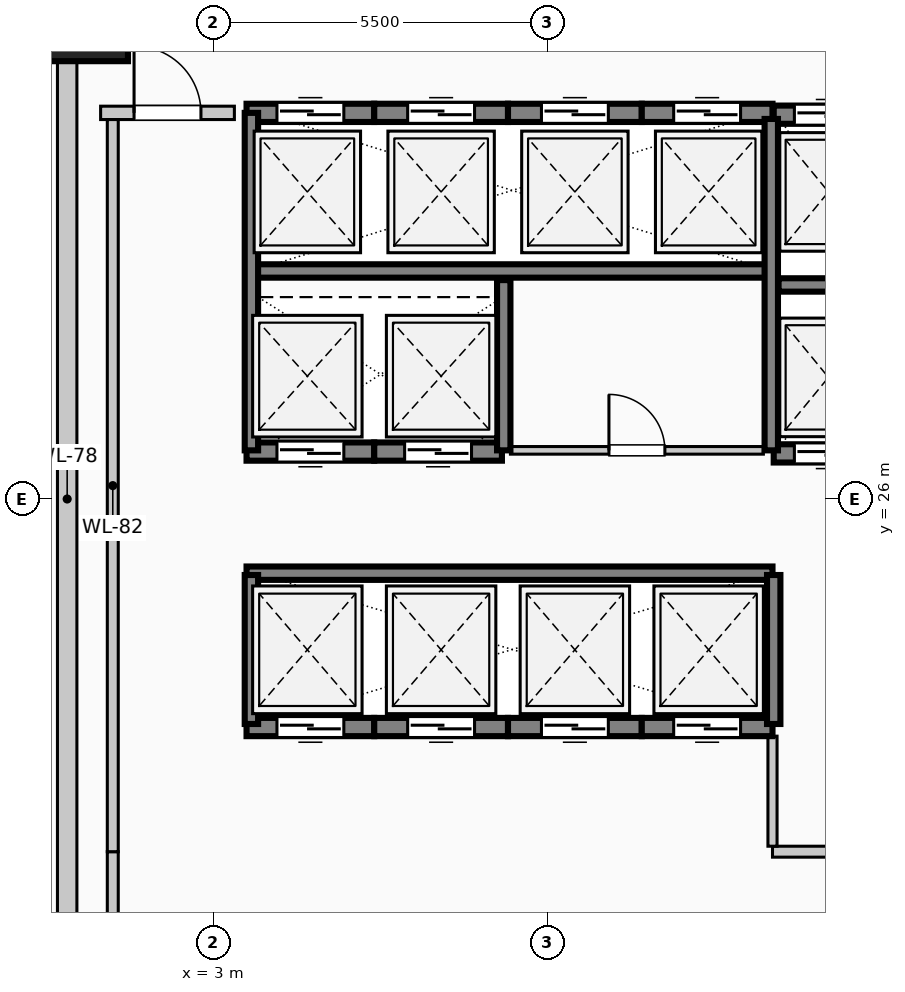
"""IFC4 building model, lengths in metres.
Left out: names, types, materials, properties, quantities, classifications, styles, units other than length and angle.
Written with IfcOpenShell. Run it as: python <this file> out.ifc"""

import sys

from ifc_helpers import new_model, si_unit, direction, frame, frame_2d, origin, origin_2d, place, context, subcontext, project, spatial, rectangle, extrude, element, fill, save


model = new_model("IFC4")
c1 = context("Model", 3, precision=1e-05, world=origin(), true_north=direction((0.0, 1.0)))
c2 = subcontext(c1, "Body", "Model", "MODEL_VIEW")
j1 = project(units=[si_unit("LENGTHUNIT", "METRE"), si_unit("PLANEANGLEUNIT", "RADIAN")], contexts=[c1])
p1 = place(None, origin())
s1 = spatial("IfcSite", under=j1, at=p1, CompositionType="ELEMENT")
p2 = place(p1, origin())
s2 = spatial("IfcBuilding", under=s1, at=p2, CompositionType="ELEMENT")
p3 = place(p2, origin())
s3 = spatial("IfcBuildingStorey", under=s2, at=p3, CompositionType="ELEMENT", Elevation=0.0)
p4 = place(p3, frame((0.6, 34.0, 0.0), z_axis=(0.0, 0.0, 1.0), x_axis=(0.0, 1.0, 0.0)))
e1 = element("IfcColumn", 1, at=p4, inside=s3, PredefinedType="COLUMN", context=c2, shape_type="SweptSolid", body=[
    extrude(rectangle(XDim=1.6, YDim=2.0, at=origin_2d()), origin(), (0.0, 0.0, 1.0), 5.4),
])
p5 = place(p3, frame((0.6, 18.82, 0.0), z_axis=(0.0, 0.0, 1.0), x_axis=(0.0, 1.0, 0.0)))
e2 = element("IfcWall", 2, at=p5, inside=s3, PredefinedType="SOLIDWALL", context=c2, shape_type="SweptSolid", body=[
    extrude(rectangle(XDim=14.36, YDim=0.32, at=frame_2d((7.18, 0.0))), origin(), (0.0, 0.0, 1.0), 4.05),
])
p6 = place(p3, frame((5.65, 22.25, 0.0), z_axis=(0.0, 0.0, 1.0), x_axis=(-1.0, 0.0, 0.0)))
e3 = element("IfcWall", 3, at=p6, inside=s3, PredefinedType="SOLIDWALL", context=c2, shape_type="SweptSolid", body=[
    extrude(rectangle(XDim=2.1, YDim=0.3, at=frame_2d((1.05, 0.0))), origin(), (0.0, 0.0, 1.0), 5.4),
])
p7 = place(p6, frame((0.5, 0.0, 0.0)))
e4 = element("IfcOpeningElement", 4, at=p7, cuts=e3, PredefinedType="OPENING", context=c2, shape_type="SweptSolid", body=[
    extrude(rectangle(XDim=1.1, YDim=2.2, at=frame_2d((0.55, 1.1))), frame((0.0, 0.16, 0.0), z_axis=(0.0, -1.0, 0.0), x_axis=(1.0, 0.0, 0.0)), (0.0, 0.0, 1.0), 0.32),
])
p8 = place(p3, frame((7.85, 22.25, 0.0), z_axis=(0.0, 0.0, 1.0), x_axis=(-1.0, 0.0, 0.0)))
e5 = element("IfcWall", 5, at=p8, inside=s3, PredefinedType="SOLIDWALL", context=c2, shape_type="SweptSolid", body=[
    extrude(rectangle(XDim=2.2, YDim=0.3, at=frame_2d((1.1, 0.0))), origin(), (0.0, 0.0, 1.0), 5.4),
])
p9 = place(p8, frame((0.55, 0.0, 0.0)))
e6 = element("IfcOpeningElement", 6, at=p9, cuts=e5, PredefinedType="OPENING", context=c2, shape_type="SweptSolid", body=[
    extrude(rectangle(XDim=1.1, YDim=2.2, at=frame_2d((0.55, 1.1))), frame((0.0, 0.16, 0.0), z_axis=(0.0, -1.0, 0.0), x_axis=(1.0, 0.0, 0.0)), (0.0, 0.0, 1.0), 0.32),
])
p10 = place(p3, frame((10.05, 22.25, 0.0), z_axis=(0.0, 0.0, 1.0), x_axis=(-1.0, 0.0, 0.0)))
e7 = element("IfcWall", 7, at=p10, inside=s3, PredefinedType="SOLIDWALL", context=c2, shape_type="SweptSolid", body=[
    extrude(rectangle(XDim=2.2, YDim=0.3, at=frame_2d((1.1, 0.0))), origin(), (0.0, 0.0, 1.0), 5.4),
])
p11 = place(p10, frame((0.55, 0.0, 0.0)))
e8 = element("IfcOpeningElement", 8, at=p11, cuts=e7, PredefinedType="OPENING", context=c2, shape_type="SweptSolid", body=[
    extrude(rectangle(XDim=1.1, YDim=2.2, at=frame_2d((0.55, 1.1))), frame((0.0, 0.16, 0.0), z_axis=(0.0, -1.0, 0.0), x_axis=(1.0, 0.0, 0.0)), (0.0, 0.0, 1.0), 0.32),
])
p12 = place(p3, frame((12.2, 22.25, 0.0), z_axis=(0.0, 0.0, 1.0), x_axis=(-1.0, 0.0, 0.0)))
e9 = element("IfcWall", 9, at=p12, inside=s3, PredefinedType="SOLIDWALL", context=c2, shape_type="SweptSolid", body=[
    extrude(rectangle(XDim=2.15, YDim=0.3, at=frame_2d((1.075, 0.0))), origin(), (0.0, 0.0, 1.0), 5.4),
])
p13 = place(p12, frame((0.525, 0.0, 0.0)))
e10 = element("IfcOpeningElement", 10, at=p13, cuts=e9, PredefinedType="OPENING", context=c2, shape_type="SweptSolid", body=[
    extrude(rectangle(XDim=1.1, YDim=2.2, at=frame_2d((0.55, 1.1))), frame((0.0, 0.16, 0.0), z_axis=(0.0, -1.0, 0.0), x_axis=(1.0, 0.0, 0.0)), (0.0, 0.0, 1.0), 0.32),
])
p14 = place(p3, frame((14.0, 26.75, 0.0), z_axis=(0.0, 0.0, 1.0), x_axis=(-1.0, 0.0, 0.0)))
e11 = element("IfcWall", 11, at=p14, inside=s3, PredefinedType="SOLIDWALL", context=c2, shape_type="SweptSolid", body=[
    extrude(rectangle(XDim=1.78, YDim=0.3, at=frame_2d((0.89, 0.0))), origin(), (0.0, 0.0, 1.0), 5.4),
])
p15 = place(p14, frame((0.34, 0.0, 0.0)))
e12 = element("IfcOpeningElement", 12, at=p15, cuts=e11, PredefinedType="OPENING", context=c2, shape_type="SweptSolid", body=[
    extrude(rectangle(XDim=1.1, YDim=2.2, at=frame_2d((0.55, 1.1))), frame((0.0, 0.16, 0.0), z_axis=(0.0, -1.0, 0.0), x_axis=(1.0, 0.0, 0.0)), (0.0, 0.0, 1.0), 0.32),
])
p16 = place(p3, frame((12.22, 32.32, 0.0), z_axis=(0.0, 0.0, 1.0), x_axis=(1.0, 0.0, 0.0)))
e13 = element("IfcWall", 13, at=p16, inside=s3, PredefinedType="SOLIDWALL", context=c2, shape_type="SweptSolid", body=[
    extrude(rectangle(XDim=1.78, YDim=0.3, at=frame_2d((0.89, 0.0))), origin(), (0.0, 0.0, 1.0), 5.4),
])
p17 = place(p16, frame((0.34, 0.0, 0.0)))
e14 = element("IfcOpeningElement", 14, at=p17, cuts=e13, PredefinedType="OPENING", context=c2, shape_type="SweptSolid", body=[
    extrude(rectangle(XDim=1.1, YDim=2.2, at=frame_2d((0.55, 1.1))), frame((0.0, 0.16, 0.0), z_axis=(0.0, -1.0, 0.0), x_axis=(1.0, 0.0, 0.0)), (0.0, 0.0, 1.0), 0.32),
])
p18 = place(p3, frame((3.55, 32.35, 0.0), z_axis=(0.0, 0.0, 1.0), x_axis=(1.0, 0.0, 0.0)))
e15 = element("IfcWall", 15, at=p18, inside=s3, PredefinedType="SOLIDWALL", context=c2, shape_type="SweptSolid", body=[
    extrude(rectangle(XDim=2.1, YDim=0.3, at=frame_2d((1.05, 0.0))), origin(), (0.0, 0.0, 1.0), 5.4),
])
p19 = place(p18, frame((0.5, 0.0, 0.0)))
e16 = element("IfcOpeningElement", 16, at=p19, cuts=e15, PredefinedType="OPENING", context=c2, shape_type="SweptSolid", body=[
    extrude(rectangle(XDim=1.1, YDim=2.2, at=frame_2d((0.55, 1.1))), frame((0.0, 0.16, 0.0), z_axis=(0.0, -1.0, 0.0), x_axis=(1.0, 0.0, 0.0)), (0.0, 0.0, 1.0), 0.32),
])
p20 = place(p3, frame((5.65, 32.35, 0.0), z_axis=(0.0, 0.0, 1.0), x_axis=(1.0, 0.0, 0.0)))
e17 = element("IfcWall", 17, at=p20, inside=s3, PredefinedType="SOLIDWALL", context=c2, shape_type="SweptSolid", body=[
    extrude(rectangle(XDim=2.2, YDim=0.3, at=frame_2d((1.1, 0.0))), origin(), (0.0, 0.0, 1.0), 5.4),
])
p21 = place(p20, frame((0.55, 0.0, 0.0)))
e18 = element("IfcOpeningElement", 18, at=p21, cuts=e17, PredefinedType="OPENING", context=c2, shape_type="SweptSolid", body=[
    extrude(rectangle(XDim=1.1, YDim=2.2, at=frame_2d((0.55, 1.1))), frame((0.0, 0.16, 0.0), z_axis=(0.0, -1.0, 0.0), x_axis=(1.0, 0.0, 0.0)), (0.0, 0.0, 1.0), 0.32),
])
p22 = place(p3, frame((7.85, 32.35, 0.0), z_axis=(0.0, 0.0, 1.0), x_axis=(1.0, 0.0, 0.0)))
e19 = element("IfcWall", 19, at=p22, inside=s3, PredefinedType="SOLIDWALL", context=c2, shape_type="SweptSolid", body=[
    extrude(rectangle(XDim=2.2, YDim=0.3, at=frame_2d((1.1, 0.0))), origin(), (0.0, 0.0, 1.0), 5.4),
])
p23 = place(p22, frame((0.55, 0.0, 0.0)))
e20 = element("IfcOpeningElement", 20, at=p23, cuts=e19, PredefinedType="OPENING", context=c2, shape_type="SweptSolid", body=[
    extrude(rectangle(XDim=1.1, YDim=2.2, at=frame_2d((0.55, 1.1))), frame((0.0, 0.16, 0.0), z_axis=(0.0, -1.0, 0.0), x_axis=(1.0, 0.0, 0.0)), (0.0, 0.0, 1.0), 0.32),
])
p24 = place(p3, frame((10.05, 32.35, 0.0), z_axis=(0.0, 0.0, 1.0), x_axis=(1.0, 0.0, 0.0)))
e21 = element("IfcWall", 21, at=p24, inside=s3, PredefinedType="SOLIDWALL", context=c2, shape_type="SweptSolid", body=[
    extrude(rectangle(XDim=2.15, YDim=0.3, at=frame_2d((1.075, 0.0))), origin(), (0.0, 0.0, 1.0), 5.4),
])
p25 = place(p24, frame((0.525, 0.0, 0.0)))
e22 = element("IfcOpeningElement", 22, at=p25, cuts=e21, PredefinedType="OPENING", context=c2, shape_type="SweptSolid", body=[
    extrude(rectangle(XDim=1.1, YDim=2.2, at=frame_2d((0.55, 1.1))), frame((0.0, 0.16, 0.0), z_axis=(0.0, -1.0, 0.0), x_axis=(1.0, 0.0, 0.0)), (0.0, 0.0, 1.0), 0.32),
])
p26 = place(p3, frame((5.65, 26.78, 0.0), z_axis=(0.0, 0.0, 1.0), x_axis=(-1.0, 0.0, 0.0)))
e23 = element("IfcWall", 23, at=p26, inside=s3, PredefinedType="SOLIDWALL", context=c2, shape_type="SweptSolid", body=[
    extrude(rectangle(XDim=2.1, YDim=0.3, at=frame_2d((1.05, 0.0))), origin(), (0.0, 0.0, 1.0), 5.4),
])
p27 = place(p26, frame((0.5, 0.0, 0.0)))
e24 = element("IfcOpeningElement", 24, at=p27, cuts=e23, PredefinedType="OPENING", context=c2, shape_type="SweptSolid", body=[
    extrude(rectangle(XDim=1.1, YDim=2.2, at=frame_2d((0.55, 1.1))), frame((0.0, 0.16, 0.0), z_axis=(0.0, -1.0, 0.0), x_axis=(1.0, 0.0, 0.0)), (0.0, 0.0, 1.0), 0.32),
])
p28 = place(p3, frame((7.75, 26.78, 0.0), z_axis=(0.0, 0.0, 1.0), x_axis=(-1.0, 0.0, 0.0)))
e25 = element("IfcWall", 25, at=p28, inside=s3, PredefinedType="SOLIDWALL", context=c2, shape_type="SweptSolid", body=[
    extrude(rectangle(XDim=2.1, YDim=0.3, at=frame_2d((1.05, 0.0))), origin(), (0.0, 0.0, 1.0), 5.4),
])
p29 = place(p28, frame((0.5, 0.0, 0.0)))
e26 = element("IfcOpeningElement", 26, at=p29, cuts=e25, PredefinedType="OPENING", context=c2, shape_type="SweptSolid", body=[
    extrude(rectangle(XDim=1.1, YDim=2.2, at=frame_2d((0.55, 1.1))), frame((0.0, 0.16, 0.0), z_axis=(0.0, -1.0, 0.0), x_axis=(1.0, 0.0, 0.0)), (0.0, 0.0, 1.0), 0.32),
])
p30 = place(p3, frame((3.55, 29.75, 0.0), z_axis=(0.0, 0.0, 1.0), x_axis=(1.0, 0.0, 0.0)))
e27 = element("IfcWall", 27, at=p30, inside=s3, PredefinedType="SOLIDWALL", context=c2, shape_type="SweptSolid", body=[
    extrude(rectangle(XDim=8.65, YDim=0.22, at=frame_2d((4.325, 0.0))), origin(), (0.0, 0.0, 1.0), 5.4),
])
p31 = place(p3, frame((3.63, 26.8, 0.0), z_axis=(0.0, 0.0, 1.0), x_axis=(0.0, 1.0, 0.0)))
e28 = element("IfcWall", 28, at=p31, inside=s3, PredefinedType="SOLIDWALL", context=c2, shape_type="SweptSolid", body=[
    extrude(rectangle(XDim=5.55, YDim=0.22, at=frame_2d((2.775, 0.0))), origin(), (0.0, 0.0, 1.0), 5.4),
])
p32 = place(p3, frame((7.78, 26.8, 0.0), z_axis=(0.0, 0.0, 1.0), x_axis=(0.0, 1.0, 0.0)))
e29 = element("IfcWall", 29, at=p32, inside=s3, PredefinedType="SOLIDWALL", context=c2, shape_type="SweptSolid", body=[
    extrude(rectangle(XDim=2.8, YDim=0.22, at=frame_2d((1.4, 0.0))), origin(), (0.0, 0.0, 1.0), 5.4),
])
p33 = place(p3, frame((12.18, 26.8, 0.0), z_axis=(0.0, 0.0, 1.0), x_axis=(0.0, 1.0, 0.0)))
e30 = element("IfcWall", 30, at=p33, inside=s3, PredefinedType="SOLIDWALL", context=c2, shape_type="SweptSolid", body=[
    extrude(rectangle(XDim=5.45, YDim=0.22, at=frame_2d((2.725, 0.0))), origin(), (0.0, 0.0, 1.0), 5.4),
])
p34 = place(p3, frame((12.3, 29.52, 0.0), z_axis=(0.0, 0.0, 1.0), x_axis=(1.0, 0.0, 0.0)))
e31 = element("IfcWall", 31, at=p34, inside=s3, PredefinedType="SOLIDWALL", context=c2, shape_type="SweptSolid", body=[
    extrude(rectangle(XDim=3.4, YDim=0.22, at=frame_2d((1.7, 0.0))), origin(), (0.0, 0.0, 1.0), 5.4),
])
p35 = place(p3, frame((3.55, 24.78, 0.0), z_axis=(0.0, 0.0, 1.0), x_axis=(1.0, 0.0, 0.0)))
e32 = element("IfcWall", 32, at=p35, inside=s3, PredefinedType="SOLIDWALL", context=c2, shape_type="SweptSolid", body=[
    extrude(rectangle(XDim=8.65, YDim=0.22, at=frame_2d((4.325, 0.0))), origin(), (0.0, 0.0, 1.0), 5.4),
])
for number, where, z_axis, x_axis in (
    (33, (3.63, 22.3, 0.0), (0.0, 0.0, 1.0), (0.0, 1.0, 0.0)),
    (34, (12.22, 22.3, 0.0), (0.0, 0.0, 1.0), (0.0, 1.0, 0.0)),
):
    element("IfcWall", number, at=place(p3, frame(where, z_axis=z_axis, x_axis=x_axis)), inside=s3, PredefinedType="SOLIDWALL", context=c2, shape_type="SweptSolid", body=[
        extrude(rectangle(XDim=2.45, YDim=0.22, at=frame_2d((1.225, 0.0))), origin(), (0.0, 0.0, 1.0), 5.4),
    ])
p36 = place(p3, frame((1.15, 32.35, 0.0), z_axis=(0.0, 0.0, 1.0), x_axis=(1.0, 0.0, 0.0)))
e35 = element("IfcWall", 35, at=p36, inside=s3, PredefinedType="PARTITIONING", context=c2, shape_type="SweptSolid", body=[
    extrude(rectangle(XDim=2.2, YDim=0.22, at=frame_2d((1.1, 0.0))), origin(), (0.0, 0.0, 1.0), 5.0),
])
p37 = place(p36, frame((0.55, 0.0, 0.0)))
e36 = element("IfcOpeningElement", 36, at=p37, cuts=e35, PredefinedType="OPENING", context=c2, shape_type="SweptSolid", body=[
    extrude(rectangle(XDim=1.1, YDim=2.2, at=frame_2d((0.55, 1.1))), frame((0.0, 0.12, 0.0), z_axis=(0.0, -1.0, 0.0), x_axis=(1.0, 0.0, 0.0)), (0.0, 0.0, 1.0), 0.24),
])
p38 = place(p3, frame((12.2, 20.2, 0.0), z_axis=(0.0, 0.0, 1.0), x_axis=(1.0, 0.0, 0.0)))
e37 = element("IfcWall", 37, at=p38, inside=s3, PredefinedType="PARTITIONING", context=c2, shape_type="SweptSolid", body=[
    extrude(rectangle(XDim=3.65, YDim=0.18, at=frame_2d((1.825, 0.0))), origin(), (0.0, 0.0, 1.0), 5.0),
])
p39 = place(p3, frame((7.89, 26.8, 0.0), z_axis=(0.0, 0.0, 1.0), x_axis=(1.0, 0.0, 0.0)))
e38 = element("IfcWall", 38, at=p39, inside=s3, PredefinedType="PARTITIONING", context=c2, shape_type="SweptSolid", body=[
    extrude(rectangle(XDim=4.16, YDim=0.125, at=frame_2d((2.08, 0.0))), origin(), (0.0, 0.0, 1.0), 5.0),
])
p40 = place(p39, frame((1.62, 0.0, 0.0)))
e39 = element("IfcOpeningElement", 39, at=p40, cuts=e38, PredefinedType="OPENING", context=c2, shape_type="SweptSolid", body=[
    extrude(rectangle(XDim=0.92, YDim=2.1, at=frame_2d((0.46, 1.05))), frame((0.0, 0.073, 0.0), z_axis=(0.0, -1.0, 0.0), x_axis=(1.0, 0.0, 0.0)), (0.0, 0.0, 1.0), 0.145),
])
p41 = place(p3, frame((1.35, 19.0, 0.0), z_axis=(0.0, 0.0, 1.0), x_axis=(0.0, 1.0, 0.0)))
e40 = element("IfcWall", 40, at=p41, inside=s3, PredefinedType="PARTITIONING", context=c2, shape_type="SweptSolid", body=[
    extrude(rectangle(XDim=1.2, YDim=0.18, at=frame_2d((0.6, 0.0))), origin(), (0.0, 0.0, 1.0), 5.0),
])
p42 = place(p3, frame((1.35, 20.2, 0.0), z_axis=(0.0, 0.0, 1.0), x_axis=(0.0, 1.0, 0.0)))
e41 = element("IfcWall", 41, at=p42, inside=s3, PredefinedType="PARTITIONING", context=c2, shape_type="SweptSolid", body=[
    extrude(rectangle(XDim=12.04, YDim=0.18, at=frame_2d((6.02, 0.0))), origin(), (0.0, 0.0, 1.0), 5.0),
])
p43 = place(p3, frame((12.2, 20.29, 0.0), z_axis=(0.0, 0.0, 1.0), x_axis=(0.0, 1.0, 0.0)))
e42 = element("IfcWall", 42, at=p43, inside=s3, PredefinedType="PARTITIONING", context=c2, shape_type="SweptSolid", body=[
    extrude(rectangle(XDim=1.81, YDim=0.15, at=frame_2d((0.905, 0.0))), origin(), (0.0, 0.0, 1.0), 5.0),
])
p44 = place(p7, origin())
e43 = element("IfcDoor", 43, at=p44, inside=s3, OperationType="SLIDING_TO_LEFT", PredefinedType="DOOR", context=c2, shape_type="SweptSolid", body=[
    extrude(rectangle(XDim=1.1, YDim=2.2, at=frame_2d((0.55, 1.1))), frame((0.0, 0.025, 0.0), z_axis=(0.0, -1.0, 0.0), x_axis=(1.0, 0.0, 0.0)), (0.0, 0.0, 1.0), 0.05),
])
fill(e4, e43)
p45 = place(p9, origin())
e44 = element("IfcDoor", 44, at=p45, inside=s3, OperationType="SLIDING_TO_RIGHT", PredefinedType="DOOR", context=c2, shape_type="SweptSolid", body=[
    extrude(rectangle(XDim=1.1, YDim=2.2, at=frame_2d((0.55, 1.1))), frame((0.0, 0.025, 0.0), z_axis=(0.0, -1.0, 0.0), x_axis=(1.0, 0.0, 0.0)), (0.0, 0.0, 1.0), 0.05),
])
fill(e6, e44)
p46 = place(p11, origin())
e45 = element("IfcDoor", 45, at=p46, inside=s3, OperationType="SLIDING_TO_LEFT", PredefinedType="DOOR", context=c2, shape_type="SweptSolid", body=[
    extrude(rectangle(XDim=1.1, YDim=2.2, at=frame_2d((0.55, 1.1))), frame((0.0, 0.025, 0.0), z_axis=(0.0, -1.0, 0.0), x_axis=(1.0, 0.0, 0.0)), (0.0, 0.0, 1.0), 0.05),
])
fill(e8, e45)
p47 = place(p13, origin())
e46 = element("IfcDoor", 46, at=p47, inside=s3, OperationType="SLIDING_TO_RIGHT", PredefinedType="DOOR", context=c2, shape_type="SweptSolid", body=[
    extrude(rectangle(XDim=1.1, YDim=2.2, at=frame_2d((0.55, 1.1))), frame((0.0, 0.025, 0.0), z_axis=(0.0, -1.0, 0.0), x_axis=(1.0, 0.0, 0.0)), (0.0, 0.0, 1.0), 0.05),
])
fill(e10, e46)
p48 = place(p15, origin())
e47 = element("IfcDoor", 47, at=p48, inside=s3, OperationType="SLIDING_TO_LEFT", PredefinedType="DOOR", context=c2, shape_type="SweptSolid", body=[
    extrude(rectangle(XDim=1.1, YDim=2.2, at=frame_2d((0.55, 1.1))), frame((0.0, 0.025, 0.0), z_axis=(0.0, -1.0, 0.0), x_axis=(1.0, 0.0, 0.0)), (0.0, 0.0, 1.0), 0.05),
])
fill(e12, e47)
p49 = place(p17, origin())
e48 = element("IfcDoor", 48, at=p49, inside=s3, OperationType="SLIDING_TO_LEFT", PredefinedType="DOOR", context=c2, shape_type="SweptSolid", body=[
    extrude(rectangle(XDim=1.1, YDim=2.2, at=frame_2d((0.55, 1.1))), frame((0.0, 0.025, 0.0), z_axis=(0.0, -1.0, 0.0), x_axis=(1.0, 0.0, 0.0)), (0.0, 0.0, 1.0), 0.05),
])
fill(e14, e48)
p50 = place(p19, origin())
e49 = element("IfcDoor", 49, at=p50, inside=s3, OperationType="SLIDING_TO_LEFT", PredefinedType="DOOR", context=c2, shape_type="SweptSolid", body=[
    extrude(rectangle(XDim=1.1, YDim=2.2, at=frame_2d((0.55, 1.1))), frame((0.0, 0.025, 0.0), z_axis=(0.0, -1.0, 0.0), x_axis=(1.0, 0.0, 0.0)), (0.0, 0.0, 1.0), 0.05),
])
fill(e16, e49)
p51 = place(p21, origin())
e50 = element("IfcDoor", 50, at=p51, inside=s3, OperationType="SLIDING_TO_RIGHT", PredefinedType="DOOR", context=c2, shape_type="SweptSolid", body=[
    extrude(rectangle(XDim=1.1, YDim=2.2, at=frame_2d((0.55, 1.1))), frame((0.0, 0.025, 0.0), z_axis=(0.0, -1.0, 0.0), x_axis=(1.0, 0.0, 0.0)), (0.0, 0.0, 1.0), 0.05),
])
fill(e18, e50)
p52 = place(p23, origin())
e51 = element("IfcDoor", 51, at=p52, inside=s3, OperationType="SLIDING_TO_LEFT", PredefinedType="DOOR", context=c2, shape_type="SweptSolid", body=[
    extrude(rectangle(XDim=1.1, YDim=2.2, at=frame_2d((0.55, 1.1))), frame((0.0, 0.025, 0.0), z_axis=(0.0, -1.0, 0.0), x_axis=(1.0, 0.0, 0.0)), (0.0, 0.0, 1.0), 0.05),
])
fill(e20, e51)
p53 = place(p25, origin())
e52 = element("IfcDoor", 52, at=p53, inside=s3, OperationType="SLIDING_TO_RIGHT", PredefinedType="DOOR", context=c2, shape_type="SweptSolid", body=[
    extrude(rectangle(XDim=1.1, YDim=2.2, at=frame_2d((0.55, 1.1))), frame((0.0, 0.025, 0.0), z_axis=(0.0, -1.0, 0.0), x_axis=(1.0, 0.0, 0.0)), (0.0, 0.0, 1.0), 0.05),
])
fill(e22, e52)
p54 = place(p27, origin())
e53 = element("IfcDoor", 53, at=p54, inside=s3, OperationType="SLIDING_TO_LEFT", PredefinedType="DOOR", context=c2, shape_type="SweptSolid", body=[
    extrude(rectangle(XDim=1.1, YDim=2.2, at=frame_2d((0.55, 1.1))), frame((0.0, 0.025, 0.0), z_axis=(0.0, -1.0, 0.0), x_axis=(1.0, 0.0, 0.0)), (0.0, 0.0, 1.0), 0.05),
])
fill(e24, e53)
p55 = place(p29, origin())
e54 = element("IfcDoor", 54, at=p55, inside=s3, OperationType="SLIDING_TO_RIGHT", PredefinedType="DOOR", context=c2, shape_type="SweptSolid", body=[
    extrude(rectangle(XDim=1.1, YDim=2.2, at=frame_2d((0.55, 1.1))), frame((0.0, 0.025, 0.0), z_axis=(0.0, -1.0, 0.0), x_axis=(1.0, 0.0, 0.0)), (0.0, 0.0, 1.0), 0.05),
])
fill(e26, e54)
p56 = place(p37, origin())
e55 = element("IfcDoor", 55, at=p56, inside=s3, OperationType="SINGLE_SWING_LEFT", PredefinedType="DOOR", context=c2, shape_type="SweptSolid", body=[
    extrude(rectangle(XDim=1.1, YDim=2.2, at=frame_2d((0.55, 1.1))), frame((0.0, 0.025, 0.0), z_axis=(0.0, -1.0, 0.0), x_axis=(1.0, 0.0, 0.0)), (0.0, 0.0, 1.0), 0.05),
])
fill(e36, e55)
p57 = place(p40, origin())
e56 = element("IfcDoor", 56, at=p57, inside=s3, OperationType="SINGLE_SWING_LEFT", PredefinedType="DOOR", context=c2, shape_type="SweptSolid", body=[
    extrude(rectangle(XDim=0.92, YDim=2.1, at=frame_2d((0.46, 1.05))), frame((0.0, 0.025, 0.0), z_axis=(0.0, -1.0, 0.0), x_axis=(1.0, 0.0, 0.0)), (0.0, 0.0, 1.0), 0.05),
])
fill(e39, e56)
save(model, sys.argv[1])
